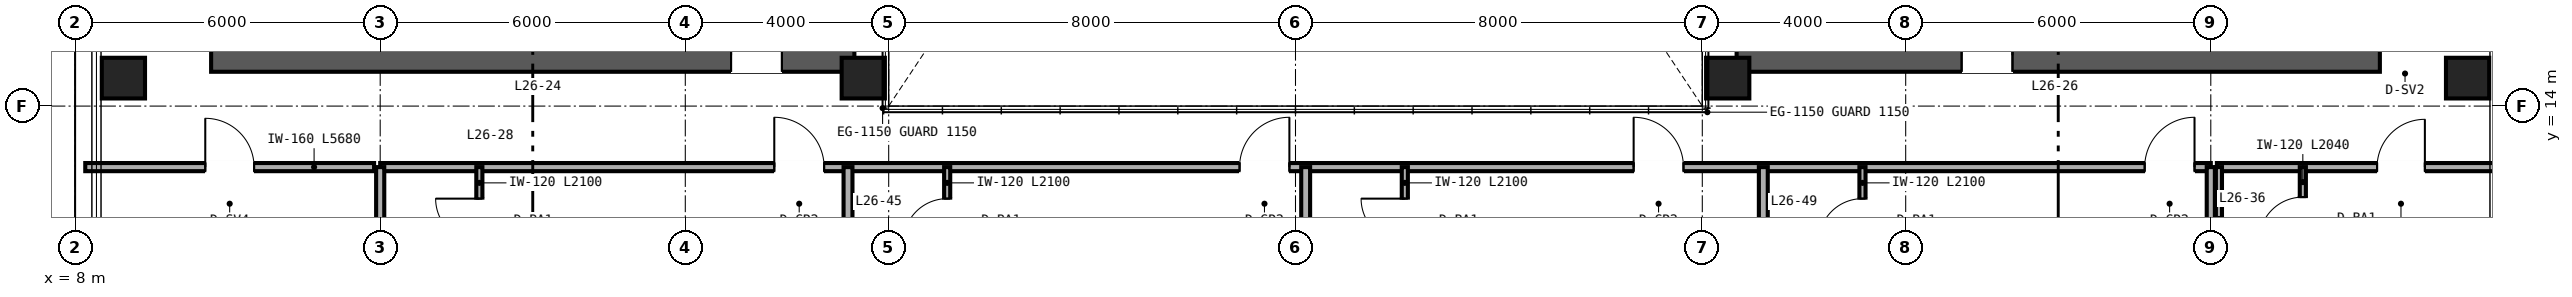
"""IFC4 building model, lengths in metres.
Left out: names, types, materials, properties, quantities, classifications, styles, units other than length and angle.
Written with IfcOpenShell. Run it as: python <this file> out.ifc"""

import sys

from ifc_helpers import new_model, si_unit, direction, frame, frame_2d, origin, origin_2d, place, context, subcontext, project, spatial, rectangle, hollow_rectangle, extrude, source, transform, mapped, element, fill, save


model = new_model("IFC4")
c1 = context("Model", 3, precision=1e-05, world=origin(), true_north=direction((0.0, 1.0)))
c2 = subcontext(c1, "Body", "Model", "MODEL_VIEW")
j1 = project(units=[si_unit("LENGTHUNIT", "METRE"), si_unit("PLANEANGLEUNIT", "RADIAN")], contexts=[c1])
p1 = place(None, origin())
s1 = spatial("IfcSite", under=j1, at=p1, CompositionType="ELEMENT")
p2 = place(p1, origin())
s2 = spatial("IfcBuilding", under=s1, at=p2, CompositionType="ELEMENT")
p3 = place(p2, frame((0.0, 0.0, 108.0)))
s3 = spatial("IfcBuildingStorey", under=s2, at=p3, CompositionType="ELEMENT", Elevation=108.0)
p4 = place(p3, frame((10.675, 15.0, 0.0), z_axis=(0.0, 0.0, 1.0), x_axis=(1.0, 0.0, 0.0)))
e1 = element("IfcWall", 1, at=p4, inside=s3, PredefinedType="SHEAR", context=c2, shape_type="SweptSolid", body=[
    extrude(rectangle(XDim=12.65, YDim=0.65, at=frame_2d((6.325, 0.0))), origin(), (0.0, 0.0, 1.0), 3.36),
])
p5 = place(p4, frame((10.225, 0.0, 0.0)))
e2 = element("IfcOpeningElement", 2, at=p5, cuts=e1, PredefinedType="OPENING", context=c2, shape_type="SweptSolid", body=[
    extrude(rectangle(XDim=1.0, YDim=2.15, at=frame_2d((0.5, 1.075))), frame((0.0, 0.335, 0.0), z_axis=(0.0, -1.0, 0.0), x_axis=(1.0, 0.0, 0.0)), (0.0, 0.0, 1.0), 0.67),
])
p6 = place(p3, frame((40.675, 15.0, 0.0), z_axis=(0.0, 0.0, 1.0), x_axis=(1.0, 0.0, 0.0)))
e3 = element("IfcWall", 3, at=p6, inside=s3, PredefinedType="SHEAR", context=c2, shape_type="SweptSolid", body=[
    extrude(rectangle(XDim=12.65, YDim=0.65, at=frame_2d((6.325, 0.0))), origin(), (0.0, 0.0, 1.0), 3.36),
])
p7 = place(p6, frame((4.425, 0.0, 0.0)))
e4 = element("IfcOpeningElement", 4, at=p7, cuts=e3, PredefinedType="OPENING", context=c2, shape_type="SweptSolid", body=[
    extrude(rectangle(XDim=1.0, YDim=2.15, at=frame_2d((0.5, 1.075))), frame((0.0, 0.335, 0.0), z_axis=(0.0, -1.0, 0.0), x_axis=(1.0, 0.0, 0.0)), (0.0, 0.0, 1.0), 0.67),
])
m1 = source(origin(), c2, "Body", "SweptSolid", [
    extrude(hollow_rectangle(XDim=0.85, YDim=0.8, WallThickness=0.032, at=origin_2d()), origin(), (0.0, 0.0, 1.0), 3.36),
])
for number, where, z_axis, x_axis in (
    (5, (8.95, 14.55, 0.0), (0.0, 0.0, 1.0), (1.0, 0.0, 0.0)),
    (6, (23.5, 14.55, 0.0), (0.0, 0.0, 1.0), (1.0, 0.0, 0.0)),
    (7, (40.5, 14.55, 0.0), (0.0, 0.0, 1.0), (1.0, 0.0, 0.0)),
    (8, (55.05, 14.55, 0.0), (0.0, 0.0, 1.0), (1.0, 0.0, 0.0)),
):
    element("IfcColumn", number, at=place(p3, frame(where, z_axis=z_axis, x_axis=x_axis)), inside=s3, PredefinedType="COLUMN", context=c2, shape_type="MappedRepresentation", body=[
        mapped(m1, transform((0.0, 0.0, 0.0), scale=1.0)),
    ])
p8 = place(p3, frame((8.2, 12.8, 0.0), z_axis=(0.0, 0.0, 1.0), x_axis=(1.0, 0.0, 0.0)))
e9 = element("IfcWall", 9, at=p8, inside=s3, PredefinedType="PARTITIONING", context=c2, shape_type="SweptSolid", body=[
    extrude(rectangle(XDim=5.68, YDim=0.16, at=frame_2d((2.84, 0.0))), origin(), (0.0, 0.0, 1.0), 3.36),
])
p9 = place(p8, frame((2.36, 0.0, 0.0)))
e10 = element("IfcOpeningElement", 10, at=p9, cuts=e9, PredefinedType="OPENING", context=c2, shape_type="SweptSolid", body=[
    extrude(rectangle(XDim=0.96, YDim=2.15, at=frame_2d((0.48, 1.075))), frame((0.0, 0.09, 0.0), z_axis=(0.0, -1.0, 0.0), x_axis=(1.0, 0.0, 0.0)), (0.0, 0.0, 1.0), 0.18),
])
p10 = place(p3, frame((50.12, 12.8, 0.0), z_axis=(0.0, 0.0, 1.0), x_axis=(1.0, 0.0, 0.0)))
e11 = element("IfcWall", 11, at=p10, inside=s3, PredefinedType="PARTITIONING", context=c2, shape_type="SweptSolid", body=[
    extrude(rectangle(XDim=5.68, YDim=0.16, at=frame_2d((2.84, 0.0))), origin(), (0.0, 0.0, 1.0), 3.36),
])
p11 = place(p10, frame((3.15, 0.0, 0.0)))
e12 = element("IfcOpeningElement", 12, at=p11, cuts=e11, PredefinedType="OPENING", context=c2, shape_type="SweptSolid", body=[
    extrude(rectangle(XDim=0.94, YDim=2.15, at=frame_2d((0.47, 1.075))), frame((0.0, 0.09, 0.0), z_axis=(0.0, -1.0, 0.0), x_axis=(1.0, 0.0, 0.0)), (0.0, 0.0, 1.0), 0.18),
])
p12 = place(p3, frame((51.81, 10.76, 0.0), z_axis=(0.0, 0.0, 1.0), x_axis=(0.0, 1.0, 0.0)))
e13 = element("IfcWall", 13, at=p12, inside=s3, PredefinedType="PARTITIONING", context=c2, shape_type="SweptSolid", body=[
    extrude(rectangle(XDim=2.04, YDim=0.12, at=frame_2d((1.02, 0.0))), origin(), (0.0, 0.0, 1.0), 3.36),
])
p13 = place(p12, frame((0.59, 0.0, 0.0)))
e14 = element("IfcOpeningElement", 14, at=p13, cuts=e13, PredefinedType="OPENING", context=c2, shape_type="SweptSolid", body=[
    extrude(rectangle(XDim=0.86, YDim=2.1, at=frame_2d((0.43, 1.05))), frame((0.0, 0.07, 0.0), z_axis=(0.0, -1.0, 0.0), x_axis=(1.0, 0.0, 0.0)), (0.0, 0.0, 1.0), 0.14),
])
p14 = place(p3, frame((50.16, 10.76, 0.0), z_axis=(0.0, 0.0, 1.0), x_axis=(0.0, 1.0, 0.0)))
e15 = element("IfcWall", 15, at=p14, inside=s3, PredefinedType="PARTITIONING", context=c2, shape_type="SweptSolid", body=[
    extrude(rectangle(XDim=2.04, YDim=0.12, at=frame_2d((1.02, 0.0))), origin(), (0.0, 0.0, 1.0), 3.36),
])
p15 = place(p3, frame((14.0, 12.8, 0.0), z_axis=(0.0, 0.0, 1.0), x_axis=(1.0, 0.0, 0.0)))
e16 = element("IfcWall", 16, at=p15, inside=s3, PredefinedType="PARTITIONING", context=c2, shape_type="SweptSolid", body=[
    extrude(rectangle(XDim=36.0, YDim=0.16, at=frame_2d((18.0, 0.0))), origin(), (0.0, 0.0, 1.0), 2.581),
])
p16 = place(p15, frame((7.75, 0.0, 0.0)))
e17 = element("IfcOpeningElement", 17, at=p16, cuts=e16, PredefinedType="OPENING", context=c2, shape_type="SweptSolid", body=[
    extrude(rectangle(XDim=0.98, YDim=2.2, at=frame_2d((0.49, 1.1))), frame((0.0, 0.09, 0.0), z_axis=(0.0, -1.0, 0.0), x_axis=(1.0, 0.0, 0.0)), (0.0, 0.0, 1.0), 0.18),
])
p17 = place(p15, frame((16.9, 0.0, 0.0)))
e18 = element("IfcOpeningElement", 18, at=p17, cuts=e16, PredefinedType="OPENING", context=c2, shape_type="SweptSolid", body=[
    extrude(rectangle(XDim=0.98, YDim=2.2, at=frame_2d((0.49, 1.1))), frame((0.0, 0.09, 0.0), z_axis=(0.0, -1.0, 0.0), x_axis=(1.0, 0.0, 0.0)), (0.0, 0.0, 1.0), 0.18),
])
p18 = place(p15, frame((24.65, 0.0, 0.0)))
e19 = element("IfcOpeningElement", 19, at=p18, cuts=e16, PredefinedType="OPENING", context=c2, shape_type="SweptSolid", body=[
    extrude(rectangle(XDim=0.98, YDim=2.2, at=frame_2d((0.49, 1.1))), frame((0.0, 0.09, 0.0), z_axis=(0.0, -1.0, 0.0), x_axis=(1.0, 0.0, 0.0)), (0.0, 0.0, 1.0), 0.18),
])
p19 = place(p15, frame((34.7, 0.0, 0.0)))
e20 = element("IfcOpeningElement", 20, at=p19, cuts=e16, PredefinedType="OPENING", context=c2, shape_type="SweptSolid", body=[
    extrude(rectangle(XDim=0.98, YDim=2.2, at=frame_2d((0.49, 1.1))), frame((0.0, 0.09, 0.0), z_axis=(0.0, -1.0, 0.0), x_axis=(1.0, 0.0, 0.0)), (0.0, 0.0, 1.0), 0.18),
])
for number, where, z_axis, x_axis in (
    (21, (14.0, 2.36, 0.0), (0.0, 0.0, 1.0), (0.0, 1.0, 0.0)),
    (22, (50.0, 2.36, 0.0), (0.0, 0.0, 1.0), (0.0, 1.0, 0.0)),
):
    element("IfcWall", number, at=place(p3, frame(where, z_axis=z_axis, x_axis=x_axis)), inside=s3, PredefinedType="PARTITIONING", context=c2, shape_type="SweptSolid", body=[
        extrude(rectangle(XDim=10.44, YDim=0.16, at=frame_2d((5.22, 0.0))), origin(), (0.0, 0.0, 1.0), 2.667),
    ])
p20 = place(p3, frame((23.2, 2.36, 0.0), z_axis=(0.0, 0.0, 1.0), x_axis=(0.0, 1.0, 0.0)))
e23 = element("IfcWall", 23, at=p20, inside=s3, PredefinedType="PARTITIONING", context=c2, shape_type="SweptSolid", body=[
    extrude(rectangle(XDim=10.44, YDim=0.175, at=frame_2d((5.22, 0.0))), origin(), (0.0, 0.0, 1.0), 2.433),
])
p21 = place(p3, frame((15.95, 10.7, 0.0), z_axis=(0.0, 0.0, 1.0), x_axis=(0.0, 1.0, 0.0)))
e24 = element("IfcWall", 24, at=p21, inside=s3, PredefinedType="PARTITIONING", context=c2, shape_type="SweptSolid", body=[
    extrude(rectangle(XDim=2.1, YDim=0.12, at=frame_2d((1.05, 0.0))), origin(), (0.0, 0.0, 1.0), 3.36),
])
p22 = place(p21, frame((0.62, 0.0, 0.0)))
e25 = element("IfcOpeningElement", 25, at=p22, cuts=e24, PredefinedType="OPENING", context=c2, shape_type="SweptSolid", body=[
    extrude(rectangle(XDim=0.86, YDim=2.1, at=frame_2d((0.43, 1.05))), frame((0.0, 0.07, 0.0), z_axis=(0.0, -1.0, 0.0), x_axis=(1.0, 0.0, 0.0)), (0.0, 0.0, 1.0), 0.14),
])
p23 = place(p3, frame((32.2, 2.36, 0.0), z_axis=(0.0, 0.0, 1.0), x_axis=(0.0, 1.0, 0.0)))
e26 = element("IfcWall", 26, at=p23, inside=s3, PredefinedType="PARTITIONING", context=c2, shape_type="SweptSolid", body=[
    extrude(rectangle(XDim=10.44, YDim=0.175, at=frame_2d((5.22, 0.0))), origin(), (0.0, 0.0, 1.0), 2.433),
])
p24 = place(p3, frame((25.15, 10.7, 0.0), z_axis=(0.0, 0.0, 1.0), x_axis=(0.0, 1.0, 0.0)))
e27 = element("IfcWall", 27, at=p24, inside=s3, PredefinedType="PARTITIONING", context=c2, shape_type="SweptSolid", body=[
    extrude(rectangle(XDim=2.1, YDim=0.12, at=frame_2d((1.05, 0.0))), origin(), (0.0, 0.0, 1.0), 3.36),
])
p25 = place(p24, frame((0.62, 0.0, 0.0)))
e28 = element("IfcOpeningElement", 28, at=p25, cuts=e27, PredefinedType="OPENING", context=c2, shape_type="SweptSolid", body=[
    extrude(rectangle(XDim=0.86, YDim=2.1, at=frame_2d((0.43, 1.05))), frame((0.0, 0.07, 0.0), z_axis=(0.0, -1.0, 0.0), x_axis=(1.0, 0.0, 0.0)), (0.0, 0.0, 1.0), 0.14),
])
p26 = place(p3, frame((41.2, 2.36, 0.0), z_axis=(0.0, 0.0, 1.0), x_axis=(0.0, 1.0, 0.0)))
e29 = element("IfcWall", 29, at=p26, inside=s3, PredefinedType="PARTITIONING", context=c2, shape_type="SweptSolid", body=[
    extrude(rectangle(XDim=10.44, YDim=0.175, at=frame_2d((5.22, 0.0))), origin(), (0.0, 0.0, 1.0), 2.823),
])
p27 = place(p3, frame((34.15, 10.7, 0.0), z_axis=(0.0, 0.0, 1.0), x_axis=(0.0, 1.0, 0.0)))
e30 = element("IfcWall", 30, at=p27, inside=s3, PredefinedType="PARTITIONING", context=c2, shape_type="SweptSolid", body=[
    extrude(rectangle(XDim=2.1, YDim=0.12, at=frame_2d((1.05, 0.0))), origin(), (0.0, 0.0, 1.0), 3.36),
])
p28 = place(p27, frame((0.62, 0.0, 0.0)))
e31 = element("IfcOpeningElement", 31, at=p28, cuts=e30, PredefinedType="OPENING", context=c2, shape_type="SweptSolid", body=[
    extrude(rectangle(XDim=0.86, YDim=2.1, at=frame_2d((0.43, 1.05))), frame((0.0, 0.07, 0.0), z_axis=(0.0, -1.0, 0.0), x_axis=(1.0, 0.0, 0.0)), (0.0, 0.0, 1.0), 0.14),
])
p29 = place(p3, frame((43.15, 10.7, 0.0), z_axis=(0.0, 0.0, 1.0), x_axis=(0.0, 1.0, 0.0)))
e32 = element("IfcWall", 32, at=p29, inside=s3, PredefinedType="PARTITIONING", context=c2, shape_type="SweptSolid", body=[
    extrude(rectangle(XDim=2.1, YDim=0.12, at=frame_2d((1.05, 0.0))), origin(), (0.0, 0.0, 1.0), 3.36),
])
p30 = place(p29, frame((0.62, 0.0, 0.0)))
e33 = element("IfcOpeningElement", 33, at=p30, cuts=e32, PredefinedType="OPENING", context=c2, shape_type="SweptSolid", body=[
    extrude(rectangle(XDim=0.86, YDim=2.1, at=frame_2d((0.43, 1.05))), frame((0.0, 0.07, 0.0), z_axis=(0.0, -1.0, 0.0), x_axis=(1.0, 0.0, 0.0)), (0.0, 0.0, 1.0), 0.14),
])
m2 = source(origin(), c2, "Body", "SweptSolid", [
    extrude(rectangle(XDim=1.0, YDim=2.15, at=frame_2d((0.5, 1.075))), frame((0.0, 0.025, 0.0), z_axis=(0.0, -1.0, 0.0), x_axis=(1.0, 0.0, 0.0)), (0.0, 0.0, 1.0), 0.05),
])
p31 = place(p5, origin())
e34 = element("IfcDoor", 34, at=p31, inside=s3, OperationType="SINGLE_SWING_LEFT", PredefinedType="DOOR", context=c2, shape_type="MappedRepresentation", body=[
    mapped(m2, transform((0.0, 0.0, 0.0), scale=1.0)),
])
fill(e2, e34)
p32 = place(p7, origin())
e35 = element("IfcDoor", 35, at=p32, inside=s3, OperationType="SINGLE_SWING_RIGHT", PredefinedType="DOOR", context=c2, shape_type="MappedRepresentation", body=[
    mapped(m2, transform((0.0, 0.0, 0.0), scale=1.0)),
])
fill(e4, e35)
m3 = source(origin(), c2, "Body", "SweptSolid", [
    extrude(rectangle(XDim=0.96, YDim=2.15, at=frame_2d((0.48, 1.075))), frame((0.0, 0.025, 0.0), z_axis=(0.0, -1.0, 0.0), x_axis=(1.0, 0.0, 0.0)), (0.0, 0.0, 1.0), 0.05),
])
p33 = place(p9, origin())
e36 = element("IfcDoor", 36, at=p33, inside=s3, OperationType="SINGLE_SWING_LEFT", PredefinedType="DOOR", context=c2, shape_type="MappedRepresentation", body=[
    mapped(m3, transform((0.0, 0.0, 0.0), scale=1.0)),
])
fill(e10, e36)
m4 = source(origin(), c2, "Body", "SweptSolid", [
    extrude(rectangle(XDim=0.86, YDim=2.1, at=frame_2d((0.43, 1.05))), frame((0.0, 0.025, 0.0), z_axis=(0.0, -1.0, 0.0), x_axis=(1.0, 0.0, 0.0)), (0.0, 0.0, 1.0), 0.05),
])
p34 = place(p13, origin())
e37 = element("IfcDoor", 37, at=p34, inside=s3, OperationType="SINGLE_SWING_LEFT", PredefinedType="DOOR", context=c2, shape_type="MappedRepresentation", body=[
    mapped(m4, transform((0.0, 0.0, 0.0), scale=1.0)),
])
fill(e14, e37)
m5 = source(origin(), c2, "Body", "SweptSolid", [
    extrude(rectangle(XDim=0.94, YDim=2.15, at=frame_2d((0.47, 1.075))), frame((0.0, 0.025, 0.0), z_axis=(0.0, -1.0, 0.0), x_axis=(1.0, 0.0, 0.0)), (0.0, 0.0, 1.0), 0.05),
])
p35 = place(p11, origin())
e38 = element("IfcDoor", 38, at=p35, inside=s3, OperationType="SINGLE_SWING_RIGHT", PredefinedType="DOOR", context=c2, shape_type="MappedRepresentation", body=[
    mapped(m5, transform((0.0, 0.0, 0.0), scale=1.0)),
])
fill(e12, e38)
p36 = place(p22, origin())
e39 = element("IfcDoor", 39, at=p36, inside=s3, OperationType="SINGLE_SWING_RIGHT", PredefinedType="DOOR", context=c2, shape_type="MappedRepresentation", body=[
    mapped(m4, transform((0.0, 0.0, 0.0), scale=1.0)),
])
fill(e25, e39)
p37 = place(p25, origin())
e40 = element("IfcDoor", 40, at=p37, inside=s3, OperationType="SINGLE_SWING_LEFT", PredefinedType="DOOR", context=c2, shape_type="MappedRepresentation", body=[
    mapped(m4, transform((0.0, 0.0, 0.0), scale=1.0)),
])
fill(e28, e40)
p38 = place(p28, origin())
e41 = element("IfcDoor", 41, at=p38, inside=s3, OperationType="SINGLE_SWING_RIGHT", PredefinedType="DOOR", context=c2, shape_type="MappedRepresentation", body=[
    mapped(m4, transform((0.0, 0.0, 0.0), scale=1.0)),
])
fill(e31, e41)
p39 = place(p30, origin())
e42 = element("IfcDoor", 42, at=p39, inside=s3, OperationType="SINGLE_SWING_LEFT", PredefinedType="DOOR", context=c2, shape_type="MappedRepresentation", body=[
    mapped(m4, transform((0.0, 0.0, 0.0), scale=1.0)),
])
fill(e33, e42)
m6 = source(origin(), c2, "Body", "SweptSolid", [
    extrude(rectangle(XDim=0.98, YDim=2.2, at=frame_2d((0.49, 1.1))), frame((0.0, 0.025, 0.0), z_axis=(0.0, -1.0, 0.0), x_axis=(1.0, 0.0, 0.0)), (0.0, 0.0, 1.0), 0.05),
])
p40 = place(p16, origin())
e43 = element("IfcDoor", 43, at=p40, inside=s3, OperationType="SINGLE_SWING_LEFT", PredefinedType="DOOR", context=c2, shape_type="MappedRepresentation", body=[
    mapped(m6, transform((0.0, 0.0, 0.0), scale=1.0)),
])
fill(e17, e43)
p41 = place(p17, origin())
e44 = element("IfcDoor", 44, at=p41, inside=s3, OperationType="SINGLE_SWING_RIGHT", PredefinedType="DOOR", context=c2, shape_type="MappedRepresentation", body=[
    mapped(m6, transform((0.0, 0.0, 0.0), scale=1.0)),
])
fill(e18, e44)
p42 = place(p18, origin())
e45 = element("IfcDoor", 45, at=p42, inside=s3, OperationType="SINGLE_SWING_LEFT", PredefinedType="DOOR", context=c2, shape_type="MappedRepresentation", body=[
    mapped(m6, transform((0.0, 0.0, 0.0), scale=1.0)),
])
fill(e19, e45)
p43 = place(p19, origin())
e46 = element("IfcDoor", 46, at=p43, inside=s3, OperationType="SINGLE_SWING_RIGHT", PredefinedType="DOOR", context=c2, shape_type="MappedRepresentation", body=[
    mapped(m6, transform((0.0, 0.0, 0.0), scale=1.0)),
])
fill(e20, e46)
save(model, sys.argv[1])
